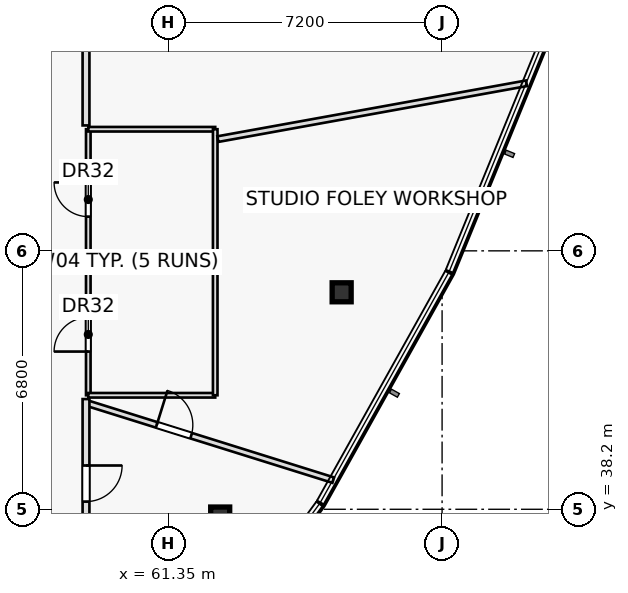
"""IFC4 building model, lengths in metres.
Left out: names, types, materials, properties, quantities, classifications, styles, units other than length and angle.
Written with IfcOpenShell. Run it as: python <this file> out.ifc"""

import sys

from ifc_helpers import new_model, si_unit, direction, frame, frame_2d, origin, origin_2d, place, context, subcontext, project, spatial, rectangle, hollow_rectangle, extrude, element, fill, save


model = new_model("IFC4")
c1 = context("Model", 3, precision=1e-05, world=origin(), true_north=direction((0.0, 1.0)))
c2 = subcontext(c1, "Body", "Model", "MODEL_VIEW")
j1 = project(units=[si_unit("LENGTHUNIT", "METRE"), si_unit("PLANEANGLEUNIT", "RADIAN")], contexts=[c1])
p1 = place(None, origin())
s1 = spatial("IfcSite", under=j1, at=p1, CompositionType="ELEMENT")
p2 = place(p1, origin())
s2 = spatial("IfcBuilding", under=s1, at=p2, CompositionType="ELEMENT")
p3 = place(p2, frame((0.0, 0.0, 253.75)))
s3 = spatial("IfcBuildingStorey", under=s2, at=p3, CompositionType="ELEMENT", Elevation=253.75)
for number, where, z_axis, x_axis in (
    (1, (62.711, 38.009, 0.0), (0.0, 0.0, 1.0), (1.0, 0.0, 0.0)),
    (2, (65.907, 43.909, 0.0), (0.0, 0.0, 1.0), (1.0, 0.0, 0.0)),
):
    element("IfcColumn", number, at=place(p3, frame(where, z_axis=z_axis, x_axis=x_axis)), inside=s3, PredefinedType="COLUMN", context=c2, shape_type="SweptSolid", body=[
        extrude(hollow_rectangle(XDim=0.5, YDim=0.5, WallThickness=0.03, at=origin_2d()), origin(), (0.0, 0.0, 1.0), 3.65),
    ])
p4 = place(p3, frame((59.24, 41.2, 0.0), z_axis=(0.0, 0.0, 1.0), x_axis=(0.0, 1.0, 0.0)))
e3 = element("IfcWall", 3, at=p4, inside=s3, PredefinedType="PARTITIONING", context=c2, shape_type="SweptSolid", body=[
    extrude(rectangle(XDim=7.0, YDim=0.12, at=frame_2d((3.5, 0.0))), origin(), (0.0, 0.0, 1.0), 3.65),
])
p5 = place(p4, frame((1.15, 0.0, 0.0)))
e4 = element("IfcOpeningElement", 4, at=p5, cuts=e3, PredefinedType="OPENING", context=c2, shape_type="SweptSolid", body=[
    extrude(rectangle(XDim=0.9, YDim=2.05, at=frame_2d((0.45, 1.025))), frame((0.0, 0.07, 0.0), z_axis=(0.0, -1.0, 0.0), x_axis=(1.0, 0.0, 0.0)), (0.0, 0.0, 1.0), 0.14),
])
p6 = place(p4, frame((4.7, 0.0, 0.0)))
e5 = element("IfcOpeningElement", 5, at=p6, cuts=e3, PredefinedType="OPENING", context=c2, shape_type="SweptSolid", body=[
    extrude(rectangle(XDim=0.9, YDim=2.05, at=frame_2d((0.45, 1.025))), frame((0.0, 0.07, 0.0), z_axis=(0.0, -1.0, 0.0), x_axis=(1.0, 0.0, 0.0)), (0.0, 0.0, 1.0), 0.14),
])
p7 = place(p3, frame((59.24, 41.2, 0.0), z_axis=(0.0, 0.0, 1.0), x_axis=(1.0, 0.0, 0.0)))
e6 = element("IfcWall", 6, at=p7, inside=s3, PredefinedType="PARTITIONING", context=c2, shape_type="SweptSolid", body=[
    extrude(rectangle(XDim=3.34, YDim=0.12, at=frame_2d((1.67, 0.0))), origin(), (0.0, 0.0, 1.0), 3.075),
])
for number, where, z_axis, x_axis in (
    (7, (59.24, 44.65, 0.0), (0.0, 0.0, 1.0), (1.0, 0.0, 0.0)),
    (8, (59.24, 48.2, 0.0), (0.0, 0.0, 1.0), (1.0, 0.0, 0.0)),
):
    element("IfcWall", number, at=place(p3, frame(where, z_axis=z_axis, x_axis=x_axis)), inside=s3, PredefinedType="PARTITIONING", context=c2, shape_type="SweptSolid", body=[
        extrude(rectangle(XDim=3.34, YDim=0.12, at=frame_2d((1.67, 0.0))), origin(), (0.0, 0.0, 1.0), 3.65),
    ])
p8 = place(p3, frame((62.58, 41.2, 0.0), z_axis=(0.0, 0.0, 1.0), x_axis=(0.0, 1.0, 0.0)))
e9 = element("IfcWall", 9, at=p8, inside=s3, PredefinedType="PARTITIONING", context=c2, shape_type="SweptSolid", body=[
    extrude(rectangle(XDim=7.0, YDim=0.12, at=frame_2d((3.5, 0.0))), origin(), (0.0, 0.0, 1.0), 3.355),
])
p9 = place(p3, frame((59.18, 41.002, 0.0), z_axis=(0.0, 0.0, 1.0), x_axis=(0.95438306304, -0.298584944332, 0.0)))
e10 = element("IfcWall", 10, at=p9, inside=s3, PredefinedType="PARTITIONING", context=c2, shape_type="SweptSolid", body=[
    extrude(rectangle(XDim=6.817, YDim=0.15, at=frame_2d((3.408, 0.0))), origin(), (0.0, 0.0, 1.0), 3.075),
])
p10 = place(p9, frame((1.95, 0.0, 0.0)))
e11 = element("IfcOpeningElement", 11, at=p10, cuts=e10, PredefinedType="OPENING", context=c2, shape_type="SweptSolid", body=[
    extrude(rectangle(XDim=0.95, YDim=2.05, at=frame_2d((0.475, 1.025))), frame((0.0, 0.085, 0.0), z_axis=(0.0, -1.0, 0.0), x_axis=(1.0, 0.0, 0.0)), (0.0, 0.0, 1.0), 0.17),
])
p11 = place(p3, frame((62.65, 47.94, 0.0), z_axis=(0.0, 0.0, 1.0), x_axis=(0.984026667132, 0.178021117775, 0.0)))
e12 = element("IfcWall", 12, at=p11, inside=s3, PredefinedType="PARTITIONING", context=c2, shape_type="SweptSolid", body=[
    extrude(rectangle(XDim=8.253, YDim=0.15, at=frame_2d((4.126, 0.0))), origin(), (0.0, 0.0, 1.0), 3.175),
])
p12 = place(p3, frame((59.18, 53.83, 0.0), z_axis=(0.0, 0.0, 1.0), x_axis=(0.0, -1.0, 0.0)))
e13 = element("IfcWall", 13, at=p12, inside=s3, PredefinedType="PARTITIONING", context=c2, shape_type="SweptSolid", body=[
    extrude(rectangle(XDim=5.53, YDim=0.18, at=frame_2d((2.765, 0.0))), origin(), (0.0, 0.0, 1.0), 3.65),
])
p13 = place(p12, frame((2.29, 0.0, 0.0)))
e14 = element("IfcOpeningElement", 14, at=p13, cuts=e13, PredefinedType="OPENING", context=c2, shape_type="SweptSolid", body=[
    extrude(rectangle(XDim=0.95, YDim=2.05, at=frame_2d((0.475, 1.025))), frame((0.0, 0.1, 0.0), z_axis=(0.0, -1.0, 0.0), x_axis=(1.0, 0.0, 0.0)), (0.0, 0.0, 1.0), 0.2),
])
p14 = place(p3, frame((59.18, 41.1, 0.0), z_axis=(0.0, 0.0, 1.0), x_axis=(0.0, -1.0, 0.0)))
e15 = element("IfcWall", 15, at=p14, inside=s3, PredefinedType="PARTITIONING", context=c2, shape_type="SweptSolid", body=[
    extrude(rectangle(XDim=4.93, YDim=0.18, at=frame_2d((2.465, 0.0))), origin(), (0.0, 0.0, 1.0), 3.355),
])
p15 = place(p14, frame((1.748, 0.0, 0.0)))
e16 = element("IfcOpeningElement", 16, at=p15, cuts=e15, PredefinedType="OPENING", context=c2, shape_type="SweptSolid", body=[
    extrude(rectangle(XDim=0.95, YDim=2.05, at=frame_2d((0.475, 1.025))), frame((0.0, 0.1, 0.0), z_axis=(0.0, -1.0, 0.0), x_axis=(1.0, 0.0, 0.0)), (0.0, 0.0, 1.0), 0.2),
])
p16 = place(p5, origin())
e17 = element("IfcDoor", 17, at=p16, inside=s3, OperationType="SINGLE_SWING_LEFT", PredefinedType="DOOR", context=c2, shape_type="SweptSolid", body=[
    extrude(rectangle(XDim=0.9, YDim=2.05, at=frame_2d((0.45, 1.025))), frame((0.0, 0.025, 0.0), z_axis=(0.0, -1.0, 0.0), x_axis=(1.0, 0.0, 0.0)), (0.0, 0.0, 1.0), 0.05),
])
fill(e4, e17)
p17 = place(p6, origin())
e18 = element("IfcDoor", 18, at=p17, inside=s3, OperationType="SINGLE_SWING_RIGHT", PredefinedType="DOOR", context=c2, shape_type="SweptSolid", body=[
    extrude(rectangle(XDim=0.9, YDim=2.05, at=frame_2d((0.45, 1.025))), frame((0.0, 0.025, 0.0), z_axis=(0.0, -1.0, 0.0), x_axis=(1.0, 0.0, 0.0)), (0.0, 0.0, 1.0), 0.05),
])
fill(e5, e18)
p18 = place(p10, origin())
e19 = element("IfcDoor", 19, at=p18, inside=s3, OperationType="SINGLE_SWING_LEFT", PredefinedType="DOOR", context=c2, shape_type="SweptSolid", body=[
    extrude(rectangle(XDim=0.95, YDim=2.05, at=frame_2d((0.475, 1.025))), frame((0.0, 0.025, 0.0), z_axis=(0.0, -1.0, 0.0), x_axis=(1.0, 0.0, 0.0)), (0.0, 0.0, 1.0), 0.05),
])
fill(e11, e19)
p19 = place(p15, origin())
e20 = element("IfcDoor", 20, at=p19, inside=s3, OperationType="SINGLE_SWING_LEFT", PredefinedType="DOOR", context=c2, shape_type="SweptSolid", body=[
    extrude(rectangle(XDim=0.95, YDim=2.05, at=frame_2d((0.475, 1.025))), frame((0.0, 0.025, 0.0), z_axis=(0.0, -1.0, 0.0), x_axis=(1.0, 0.0, 0.0)), (0.0, 0.0, 1.0), 0.05),
])
fill(e16, e20)
save(model, sys.argv[1])
